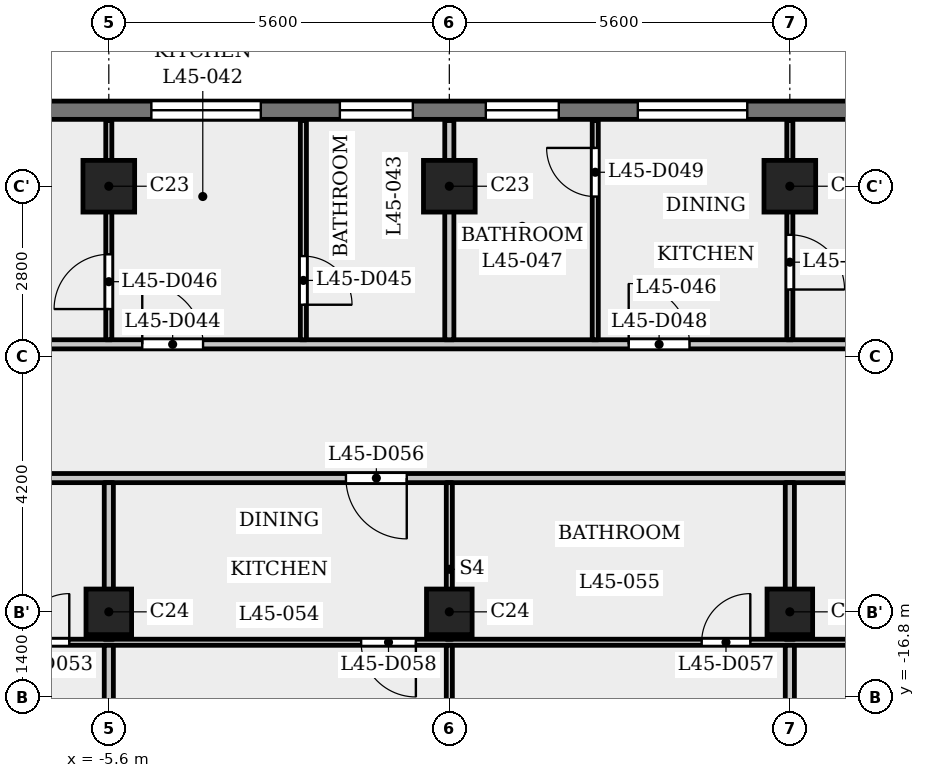
"""IFC4 building model, lengths in metres.
Left out: names, types, materials, properties, quantities, classifications, styles, units other than length and angle.
Written with IfcOpenShell. Run it as: python <this file> out.ifc"""

import sys

from ifc_helpers import new_model, si_unit, direction, frame, frame_2d, origin, origin_2d, place, context, subcontext, project, spatial, rectangle, extrude, element, fill, save


model = new_model("IFC4")
c1 = context("Model", 3, precision=1e-05, world=origin(), true_north=direction((0.0, 1.0)))
c2 = subcontext(c1, "Body", "Model", "MODEL_VIEW")
j1 = project(units=[si_unit("LENGTHUNIT", "METRE"), si_unit("PLANEANGLEUNIT", "RADIAN")], contexts=[c1])
p1 = place(None, origin())
s1 = spatial("IfcSite", under=j1, at=p1, CompositionType="ELEMENT")
p2 = place(p1, origin())
s2 = spatial("IfcBuilding", under=s1, at=p2, CompositionType="ELEMENT")
p3 = place(p2, frame((0.0, 0.0, 174.6)))
s3 = spatial("IfcBuildingStorey", under=s2, at=p3, CompositionType="ELEMENT", Elevation=174.6)
for number, where, z_axis, x_axis in (
    (1, (-5.6, -8.4, 0.0), (0.0, 0.0, 1.0), (1.0, 0.0, 0.0)),
    (2, (0.0, -8.4, 0.0), (0.0, 0.0, 1.0), (1.0, 0.0, 0.0)),
    (3, (5.6, -8.4, 0.0), (0.0, 0.0, 1.0), (1.0, 0.0, 0.0)),
):
    element("IfcColumn", number, at=place(p3, frame(where, z_axis=z_axis, x_axis=x_axis)), inside=s3, PredefinedType="COLUMN", context=c2, shape_type="SweptSolid", body=[
        extrude(rectangle(XDim=0.85, YDim=0.85, at=origin_2d()), origin(), (0.0, 0.0, 1.0), 3.5),
    ])
for number, where, z_axis, x_axis in (
    (4, (-5.6, -15.4, 0.0), (0.0, 0.0, 1.0), (1.0, 0.0, 0.0)),
    (5, (0.0, -15.4, 0.0), (0.0, 0.0, 1.0), (1.0, 0.0, 0.0)),
    (6, (5.6, -15.4, 0.0), (0.0, 0.0, 1.0), (1.0, 0.0, 0.0)),
):
    element("IfcColumn", number, at=place(p3, frame(where, z_axis=z_axis, x_axis=x_axis)), inside=s3, PredefinedType="COLUMN", context=c2, shape_type="SweptSolid", body=[
        extrude(rectangle(XDim=0.75, YDim=0.75, at=origin_2d()), origin(), (0.0, 0.0, 1.0), 3.5),
    ])
p4 = place(p3, frame((13.8, -7.15, 0.0), z_axis=(0.0, 0.0, 1.0), x_axis=(-1.0, 0.0, 0.0)))
e7 = element("IfcWall", 7, at=p4, inside=s3, PredefinedType="SOLIDWALL", context=c2, shape_type="SweptSolid", body=[
    extrude(rectangle(XDim=27.6, YDim=0.3, at=frame_2d((13.8, 0.0))), origin(), (0.0, 0.0, 1.0), 3.15),
])
p5 = place(p4, frame((0.363, 0.0, 0.9)))
e8 = element("IfcOpeningElement", 8, at=p5, cuts=e7, PredefinedType="OPENING", context=c2, shape_type="SweptSolid", body=[
    extrude(rectangle(XDim=1.8, YDim=1.25, at=frame_2d((0.9, 0.625))), frame((0.0, 0.16, 0.0), z_axis=(0.0, -1.0, 0.0), x_axis=(1.0, 0.0, 0.0)), (0.0, 0.0, 1.0), 0.32),
])
p6 = place(p4, frame((3.6, 0.0, 1.2)))
e9 = element("IfcOpeningElement", 9, at=p6, cuts=e7, PredefinedType="OPENING", context=c2, shape_type="SweptSolid", body=[
    extrude(rectangle(XDim=3.6, YDim=0.95, at=frame_2d((1.8, 0.475))), frame((0.0, 0.16, 0.0), z_axis=(0.0, -1.0, 0.0), x_axis=(1.0, 0.0, 0.0)), (0.0, 0.0, 1.0), 0.32),
])
p7 = place(p4, frame((8.9, 0.0, 0.9)))
e10 = element("IfcOpeningElement", 10, at=p7, cuts=e7, PredefinedType="OPENING", context=c2, shape_type="SweptSolid", body=[
    extrude(rectangle(XDim=1.8, YDim=1.25, at=frame_2d((0.9, 0.625))), frame((0.0, 0.16, 0.0), z_axis=(0.0, -1.0, 0.0), x_axis=(1.0, 0.0, 0.0)), (0.0, 0.0, 1.0), 0.32),
])
p8 = place(p4, frame((12.0, 0.0, 0.6)))
e11 = element("IfcOpeningElement", 11, at=p8, cuts=e7, PredefinedType="OPENING", context=c2, shape_type="SweptSolid", body=[
    extrude(rectangle(XDim=1.2, YDim=1.55, at=frame_2d((0.6, 0.775))), frame((0.0, 0.16, 0.0), z_axis=(0.0, -1.0, 0.0), x_axis=(1.0, 0.0, 0.0)), (0.0, 0.0, 1.0), 0.32),
])
p9 = place(p4, frame((14.4, 0.0, 0.6)))
e12 = element("IfcOpeningElement", 12, at=p9, cuts=e7, PredefinedType="OPENING", context=c2, shape_type="SweptSolid", body=[
    extrude(rectangle(XDim=1.2, YDim=1.55, at=frame_2d((0.6, 0.775))), frame((0.0, 0.16, 0.0), z_axis=(0.0, -1.0, 0.0), x_axis=(1.0, 0.0, 0.0)), (0.0, 0.0, 1.0), 0.32),
])
p10 = place(p4, frame((16.9, 0.0, 0.9)))
e13 = element("IfcOpeningElement", 13, at=p10, cuts=e7, PredefinedType="OPENING", context=c2, shape_type="SweptSolid", body=[
    extrude(rectangle(XDim=1.8, YDim=1.25, at=frame_2d((0.9, 0.625))), frame((0.0, 0.16, 0.0), z_axis=(0.0, -1.0, 0.0), x_axis=(1.0, 0.0, 0.0)), (0.0, 0.0, 1.0), 0.32),
])
p11 = place(p4, frame((20.4, 0.0, 1.2)))
e14 = element("IfcOpeningElement", 14, at=p11, cuts=e7, PredefinedType="OPENING", context=c2, shape_type="SweptSolid", body=[
    extrude(rectangle(XDim=3.6, YDim=0.95, at=frame_2d((1.8, 0.475))), frame((0.0, 0.16, 0.0), z_axis=(0.0, -1.0, 0.0), x_axis=(1.0, 0.0, 0.0)), (0.0, 0.0, 1.0), 0.32),
])
p12 = place(p4, frame((25.438, 0.0, 0.9)))
e15 = element("IfcOpeningElement", 15, at=p12, cuts=e7, PredefinedType="OPENING", context=c2, shape_type="SweptSolid", body=[
    extrude(rectangle(XDim=1.8, YDim=1.25, at=frame_2d((0.9, 0.625))), frame((0.0, 0.16, 0.0), z_axis=(0.0, -1.0, 0.0), x_axis=(1.0, 0.0, 0.0)), (0.0, 0.0, 1.0), 0.32),
])
p13 = place(p3, frame((-16.725, -15.9, 0.0), z_axis=(0.0, 0.0, 1.0), x_axis=(1.0, 0.0, 0.0)))
e16 = element("IfcWall", 16, at=p13, inside=s3, PredefinedType="PARTITIONING", context=c2, shape_type="SweptSolid", body=[
    extrude(rectangle(XDim=33.45, YDim=0.1, at=frame_2d((16.725, 0.0))), origin(), (0.0, 0.0, 1.0), 3.15),
])
p14 = place(p13, frame((9.675, 0.0, 0.0)))
e17 = element("IfcOpeningElement", 17, at=p14, cuts=e16, PredefinedType="OPENING", context=c2, shape_type="SweptSolid", body=[
    extrude(rectangle(XDim=0.8, YDim=2.1, at=frame_2d((0.4, 1.05))), frame((0.0, 0.06, 0.0), z_axis=(0.0, -1.0, 0.0), x_axis=(1.0, 0.0, 0.0)), (0.0, 0.0, 1.0), 0.12),
])
p15 = place(p13, frame((4.075, 0.0, 0.0)))
e18 = element("IfcOpeningElement", 18, at=p15, cuts=e16, PredefinedType="OPENING", context=c2, shape_type="SweptSolid", body=[
    extrude(rectangle(XDim=0.9, YDim=2.1, at=frame_2d((0.45, 1.05))), frame((0.0, 0.06, 0.0), z_axis=(0.0, -1.0, 0.0), x_axis=(1.0, 0.0, 0.0)), (0.0, 0.0, 1.0), 0.12),
])
p16 = place(p13, frame((20.875, 0.0, 0.0)))
e19 = element("IfcOpeningElement", 19, at=p16, cuts=e16, PredefinedType="OPENING", context=c2, shape_type="SweptSolid", body=[
    extrude(rectangle(XDim=0.8, YDim=2.1, at=frame_2d((0.4, 1.05))), frame((0.0, 0.06, 0.0), z_axis=(0.0, -1.0, 0.0), x_axis=(1.0, 0.0, 0.0)), (0.0, 0.0, 1.0), 0.12),
])
p17 = place(p13, frame((15.275, 0.0, 0.0)))
e20 = element("IfcOpeningElement", 20, at=p17, cuts=e16, PredefinedType="OPENING", context=c2, shape_type="SweptSolid", body=[
    extrude(rectangle(XDim=0.9, YDim=2.1, at=frame_2d((0.45, 1.05))), frame((0.0, 0.06, 0.0), z_axis=(0.0, -1.0, 0.0), x_axis=(1.0, 0.0, 0.0)), (0.0, 0.0, 1.0), 0.12),
])
p18 = place(p13, frame((30.825, 0.0, 0.0)))
e21 = element("IfcOpeningElement", 21, at=p18, cuts=e16, PredefinedType="OPENING", context=c2, shape_type="SweptSolid", body=[
    extrude(rectangle(XDim=0.8, YDim=2.1, at=frame_2d((0.4, 1.05))), frame((0.0, 0.06, 0.0), z_axis=(0.0, -1.0, 0.0), x_axis=(1.0, 0.0, 0.0)), (0.0, 0.0, 1.0), 0.12),
])
p19 = place(p13, frame((26.475, 0.0, 0.0)))
e22 = element("IfcOpeningElement", 22, at=p19, cuts=e16, PredefinedType="OPENING", context=c2, shape_type="SweptSolid", body=[
    extrude(rectangle(XDim=0.9, YDim=2.1, at=frame_2d((0.45, 1.05))), frame((0.0, 0.06, 0.0), z_axis=(0.0, -1.0, 0.0), x_axis=(1.0, 0.0, 0.0)), (0.0, 0.0, 1.0), 0.12),
])
p20 = place(p3, frame((-17.4, -13.2, 0.0), z_axis=(0.0, 0.0, 1.0), x_axis=(1.0, 0.0, 0.0)))
e23 = element("IfcWall", 23, at=p20, inside=s3, PredefinedType="PARTITIONING", context=c2, shape_type="SweptSolid", body=[
    extrude(rectangle(XDim=34.8, YDim=0.15, at=frame_2d((17.4, 0.0))), origin(), (0.0, 0.0, 1.0), 3.15),
])
p21 = place(p20, frame((0.15, 0.0, 0.0)))
e24 = element("IfcOpeningElement", 24, at=p21, cuts=e23, PredefinedType="OPENING", context=c2, shape_type="SweptSolid", body=[
    extrude(rectangle(XDim=1.0, YDim=2.1, at=frame_2d((0.5, 1.05))), frame((0.0, 0.085, 0.0), z_axis=(0.0, -1.0, 0.0), x_axis=(1.0, 0.0, 0.0)), (0.0, 0.0, 1.0), 0.17),
])
p22 = place(p20, frame((33.55, 0.0, 0.0)))
e25 = element("IfcOpeningElement", 25, at=p22, cuts=e23, PredefinedType="OPENING", context=c2, shape_type="SweptSolid", body=[
    extrude(rectangle(XDim=1.0, YDim=2.1, at=frame_2d((0.5, 1.05))), frame((0.0, 0.085, 0.0), z_axis=(0.0, -1.0, 0.0), x_axis=(1.0, 0.0, 0.0)), (0.0, 0.0, 1.0), 0.17),
])
p23 = place(p20, frame((15.7, 0.0, 0.0)))
e26 = element("IfcOpeningElement", 26, at=p23, cuts=e23, PredefinedType="OPENING", context=c2, shape_type="SweptSolid", body=[
    extrude(rectangle(XDim=1.0, YDim=2.1, at=frame_2d((0.5, 1.05))), frame((0.0, 0.085, 0.0), z_axis=(0.0, -1.0, 0.0), x_axis=(1.0, 0.0, 0.0)), (0.0, 0.0, 1.0), 0.17),
])
p24 = place(p20, frame((26.9, 0.0, 0.0)))
e27 = element("IfcOpeningElement", 27, at=p24, cuts=e23, PredefinedType="OPENING", context=c2, shape_type="SweptSolid", body=[
    extrude(rectangle(XDim=1.0, YDim=2.1, at=frame_2d((0.5, 1.05))), frame((0.0, 0.085, 0.0), z_axis=(0.0, -1.0, 0.0), x_axis=(1.0, 0.0, 0.0)), (0.0, 0.0, 1.0), 0.17),
])
p25 = place(p3, frame((-14.925, -11.0, 0.0), z_axis=(0.0, 0.0, 1.0), x_axis=(1.0, 0.0, 0.0)))
e28 = element("IfcWall", 28, at=p25, inside=s3, PredefinedType="PARTITIONING", context=c2, shape_type="SweptSolid", body=[
    extrude(rectangle(XDim=29.85, YDim=0.15, at=frame_2d((14.925, 0.0))), origin(), (0.0, 0.0, 1.0), 3.15),
])
p26 = place(p25, frame((9.875, 0.0, 0.0)))
e29 = element("IfcOpeningElement", 29, at=p26, cuts=e28, PredefinedType="OPENING", context=c2, shape_type="SweptSolid", body=[
    extrude(rectangle(XDim=1.0, YDim=2.1, at=frame_2d((0.5, 1.05))), frame((0.0, 0.085, 0.0), z_axis=(0.0, -1.0, 0.0), x_axis=(1.0, 0.0, 0.0)), (0.0, 0.0, 1.0), 0.17),
])
p27 = place(p25, frame((17.875, 0.0, 0.0)))
e30 = element("IfcOpeningElement", 30, at=p27, cuts=e28, PredefinedType="OPENING", context=c2, shape_type="SweptSolid", body=[
    extrude(rectangle(XDim=1.0, YDim=2.1, at=frame_2d((0.5, 1.05))), frame((0.0, 0.085, 0.0), z_axis=(0.0, -1.0, 0.0), x_axis=(1.0, 0.0, 0.0)), (0.0, 0.0, 1.0), 0.17),
])
p28 = place(p3, frame((-5.6, -10.925, 0.0), z_axis=(0.0, 0.0, 1.0), x_axis=(0.0, 1.0, 0.0)))
e31 = element("IfcWall", 31, at=p28, inside=s3, PredefinedType="PARTITIONING", context=c2, shape_type="SweptSolid", body=[
    extrude(rectangle(XDim=3.605, YDim=0.1, at=frame_2d((1.802, 0.0))), origin(), (0.0, 0.0, 1.0), 3.15),
])
p29 = place(p28, frame((0.505, 0.0, 0.0)))
e32 = element("IfcOpeningElement", 32, at=p29, cuts=e31, PredefinedType="OPENING", context=c2, shape_type="SweptSolid", body=[
    extrude(rectangle(XDim=0.9, YDim=2.1, at=frame_2d((0.45, 1.05))), frame((0.0, 0.06, 0.0), z_axis=(0.0, -1.0, 0.0), x_axis=(1.0, 0.0, 0.0)), (0.0, 0.0, 1.0), 0.12),
])
p30 = place(p3, frame((-5.6, -22.88, 0.0), z_axis=(0.0, 0.0, 1.0), x_axis=(0.0, 1.0, 0.0)))
e33 = element("IfcWall", 33, at=p30, inside=s3, PredefinedType="PARTITIONING", context=c2, shape_type="SweptSolid", body=[
    extrude(rectangle(XDim=6.93, YDim=0.15, at=frame_2d((3.465, 0.0))), origin(), (0.0, 0.0, 1.0), 3.15),
])
p31 = place(p3, frame((-5.6, -15.85, 0.0), z_axis=(0.0, 0.0, 1.0), x_axis=(0.0, 1.0, 0.0)))
e34 = element("IfcWall", 34, at=p31, inside=s3, PredefinedType="PARTITIONING", context=c2, shape_type="SweptSolid", body=[
    extrude(rectangle(XDim=2.575, YDim=0.15, at=frame_2d((1.288, 0.0))), origin(), (0.0, 0.0, 1.0), 3.15),
])
p32 = place(p3, frame((-2.4, -10.925, 0.0), z_axis=(0.0, 0.0, 1.0), x_axis=(0.0, 1.0, 0.0)))
e35 = element("IfcWall", 35, at=p32, inside=s3, PredefinedType="PARTITIONING", context=c2, shape_type="SweptSolid", body=[
    extrude(rectangle(XDim=3.605, YDim=0.1, at=frame_2d((1.802, 0.0))), origin(), (0.0, 0.0, 1.0), 3.15),
])
p33 = place(p32, frame((0.576, 0.0, 0.0)))
e36 = element("IfcOpeningElement", 36, at=p33, cuts=e35, PredefinedType="OPENING", context=c2, shape_type="SweptSolid", body=[
    extrude(rectangle(XDim=0.8, YDim=2.1, at=frame_2d((0.4, 1.05))), frame((0.0, 0.06, 0.0), z_axis=(0.0, -1.0, 0.0), x_axis=(1.0, 0.0, 0.0)), (0.0, 0.0, 1.0), 0.12),
])
p34 = place(p3, frame((0.0, -22.88, 0.0), z_axis=(0.0, 0.0, 1.0), x_axis=(0.0, 1.0, 0.0)))
e37 = element("IfcWall", 37, at=p34, inside=s3, PredefinedType="PARTITIONING", context=c2, shape_type="SweptSolid", body=[
    extrude(rectangle(XDim=6.93, YDim=0.1, at=frame_2d((3.465, 0.0))), origin(), (0.0, 0.0, 1.0), 3.15),
])
p35 = place(p34, frame((1.22, 0.0, 0.0)))
e38 = element("IfcOpeningElement", 38, at=p35, cuts=e37, PredefinedType="OPENING", context=c2, shape_type="SweptSolid", body=[
    extrude(rectangle(XDim=0.9, YDim=2.1, at=frame_2d((0.45, 1.05))), frame((0.0, 0.06, 0.0), z_axis=(0.0, -1.0, 0.0), x_axis=(1.0, 0.0, 0.0)), (0.0, 0.0, 1.0), 0.12),
])
p36 = place(p3, frame((0.0, -15.85, 0.0), z_axis=(0.0, 0.0, 1.0), x_axis=(0.0, 1.0, 0.0)))
e39 = element("IfcWall", 39, at=p36, inside=s3, PredefinedType="PARTITIONING", context=c2, shape_type="SweptSolid", body=[
    extrude(rectangle(XDim=2.575, YDim=0.1, at=frame_2d((1.288, 0.0))), origin(), (0.0, 0.0, 1.0), 3.15),
])
p37 = place(p3, frame((0.0, -10.925, 0.0), z_axis=(0.0, 0.0, 1.0), x_axis=(0.0, 1.0, 0.0)))
e40 = element("IfcWall", 40, at=p37, inside=s3, PredefinedType="PARTITIONING", context=c2, shape_type="SweptSolid", body=[
    extrude(rectangle(XDim=3.605, YDim=0.15, at=frame_2d((1.802, 0.0))), origin(), (0.0, 0.0, 1.0), 3.15),
])
p38 = place(p3, frame((2.4, -10.925, 0.0), z_axis=(0.0, 0.0, 1.0), x_axis=(0.0, 1.0, 0.0)))
e41 = element("IfcWall", 41, at=p38, inside=s3, PredefinedType="PARTITIONING", context=c2, shape_type="SweptSolid", body=[
    extrude(rectangle(XDim=3.605, YDim=0.1, at=frame_2d((1.802, 0.0))), origin(), (0.0, 0.0, 1.0), 3.15),
])
p39 = place(p38, frame((2.355, 0.0, 0.0)))
e42 = element("IfcOpeningElement", 42, at=p39, cuts=e41, PredefinedType="OPENING", context=c2, shape_type="SweptSolid", body=[
    extrude(rectangle(XDim=0.8, YDim=2.1, at=frame_2d((0.4, 1.05))), frame((0.0, 0.06, 0.0), z_axis=(0.0, -1.0, 0.0), x_axis=(1.0, 0.0, 0.0)), (0.0, 0.0, 1.0), 0.12),
])
p40 = place(p3, frame((5.6, -10.925, 0.0), z_axis=(0.0, 0.0, 1.0), x_axis=(0.0, 1.0, 0.0)))
e43 = element("IfcWall", 43, at=p40, inside=s3, PredefinedType="PARTITIONING", context=c2, shape_type="SweptSolid", body=[
    extrude(rectangle(XDim=3.605, YDim=0.1, at=frame_2d((1.802, 0.0))), origin(), (0.0, 0.0, 1.0), 3.15),
])
p41 = place(p40, frame((0.826, 0.0, 0.0)))
e44 = element("IfcOpeningElement", 44, at=p41, cuts=e43, PredefinedType="OPENING", context=c2, shape_type="SweptSolid", body=[
    extrude(rectangle(XDim=0.9, YDim=2.1, at=frame_2d((0.45, 1.05))), frame((0.0, 0.06, 0.0), z_axis=(0.0, -1.0, 0.0), x_axis=(1.0, 0.0, 0.0)), (0.0, 0.0, 1.0), 0.12),
])
p42 = place(p3, frame((5.6, -22.88, 0.0), z_axis=(0.0, 0.0, 1.0), x_axis=(0.0, 1.0, 0.0)))
e45 = element("IfcWall", 45, at=p42, inside=s3, PredefinedType="PARTITIONING", context=c2, shape_type="SweptSolid", body=[
    extrude(rectangle(XDim=6.93, YDim=0.15, at=frame_2d((3.465, 0.0))), origin(), (0.0, 0.0, 1.0), 3.15),
])
p43 = place(p3, frame((5.6, -15.85, 0.0), z_axis=(0.0, 0.0, 1.0), x_axis=(0.0, 1.0, 0.0)))
e46 = element("IfcWall", 46, at=p43, inside=s3, PredefinedType="PARTITIONING", context=c2, shape_type="SweptSolid", body=[
    extrude(rectangle(XDim=2.575, YDim=0.15, at=frame_2d((1.288, 0.0))), origin(), (0.0, 0.0, 1.0), 3.15),
])
p44 = place(p26, origin())
e47 = element("IfcDoor", 47, at=p44, inside=s3, OperationType="SINGLE_SWING_RIGHT", PredefinedType="DOOR", context=c2, shape_type="SweptSolid", body=[
    extrude(rectangle(XDim=1.0, YDim=2.1, at=frame_2d((0.5, 1.05))), frame((0.0, 0.025, 0.0), z_axis=(0.0, -1.0, 0.0), x_axis=(1.0, 0.0, 0.0)), (0.0, 0.0, 1.0), 0.05),
])
fill(e29, e47)
p45 = place(p33, origin())
e48 = element("IfcDoor", 48, at=p45, inside=s3, OperationType="SINGLE_SWING_LEFT", PredefinedType="DOOR", context=c2, shape_type="SweptSolid", body=[
    extrude(rectangle(XDim=0.8, YDim=2.1, at=frame_2d((0.4, 1.05))), frame((0.0, 0.025, 0.0), z_axis=(0.0, -1.0, 0.0), x_axis=(1.0, 0.0, 0.0)), (0.0, 0.0, 1.0), 0.05),
])
fill(e36, e48)
p46 = place(p29, origin())
e49 = element("IfcDoor", 49, at=p46, inside=s3, OperationType="SINGLE_SWING_RIGHT", PredefinedType="DOOR", context=c2, shape_type="SweptSolid", body=[
    extrude(rectangle(XDim=0.9, YDim=2.1, at=frame_2d((0.45, 1.05))), frame((0.0, 0.025, 0.0), z_axis=(0.0, -1.0, 0.0), x_axis=(1.0, 0.0, 0.0)), (0.0, 0.0, 1.0), 0.05),
])
fill(e32, e49)
p47 = place(p27, origin())
e50 = element("IfcDoor", 50, at=p47, inside=s3, OperationType="SINGLE_SWING_RIGHT", PredefinedType="DOOR", context=c2, shape_type="SweptSolid", body=[
    extrude(rectangle(XDim=1.0, YDim=2.1, at=frame_2d((0.5, 1.05))), frame((0.0, 0.025, 0.0), z_axis=(0.0, -1.0, 0.0), x_axis=(1.0, 0.0, 0.0)), (0.0, 0.0, 1.0), 0.05),
])
fill(e30, e50)
p48 = place(p39, origin())
e51 = element("IfcDoor", 51, at=p48, inside=s3, OperationType="SINGLE_SWING_LEFT", PredefinedType="DOOR", context=c2, shape_type="SweptSolid", body=[
    extrude(rectangle(XDim=0.8, YDim=2.1, at=frame_2d((0.4, 1.05))), frame((0.0, 0.025, 0.0), z_axis=(0.0, -1.0, 0.0), x_axis=(1.0, 0.0, 0.0)), (0.0, 0.0, 1.0), 0.05),
])
fill(e42, e51)
p49 = place(p41, origin())
e52 = element("IfcDoor", 52, at=p49, inside=s3, OperationType="SINGLE_SWING_LEFT", PredefinedType="DOOR", context=c2, shape_type="SweptSolid", body=[
    extrude(rectangle(XDim=0.9, YDim=2.1, at=frame_2d((0.45, 1.05))), frame((0.0, 0.025, 0.0), z_axis=(0.0, -1.0, 0.0), x_axis=(1.0, 0.0, 0.0)), (0.0, 0.0, 1.0), 0.05),
])
fill(e44, e52)
p50 = place(p14, origin())
e53 = element("IfcDoor", 53, at=p50, inside=s3, OperationType="SINGLE_SWING_LEFT", PredefinedType="DOOR", context=c2, shape_type="SweptSolid", body=[
    extrude(rectangle(XDim=0.8, YDim=2.1, at=frame_2d((0.4, 1.05))), frame((0.0, 0.025, 0.0), z_axis=(0.0, -1.0, 0.0), x_axis=(1.0, 0.0, 0.0)), (0.0, 0.0, 1.0), 0.05),
])
fill(e17, e53)
p51 = place(p23, origin())
e54 = element("IfcDoor", 54, at=p51, inside=s3, OperationType="SINGLE_SWING_RIGHT", PredefinedType="DOOR", context=c2, shape_type="SweptSolid", body=[
    extrude(rectangle(XDim=1.0, YDim=2.1, at=frame_2d((0.5, 1.05))), frame((0.0, 0.025, 0.0), z_axis=(0.0, -1.0, 0.0), x_axis=(1.0, 0.0, 0.0)), (0.0, 0.0, 1.0), 0.05),
])
fill(e26, e54)
p52 = place(p16, origin())
e55 = element("IfcDoor", 55, at=p52, inside=s3, OperationType="SINGLE_SWING_LEFT", PredefinedType="DOOR", context=c2, shape_type="SweptSolid", body=[
    extrude(rectangle(XDim=0.8, YDim=2.1, at=frame_2d((0.4, 1.05))), frame((0.0, 0.025, 0.0), z_axis=(0.0, -1.0, 0.0), x_axis=(1.0, 0.0, 0.0)), (0.0, 0.0, 1.0), 0.05),
])
fill(e19, e55)
p53 = place(p17, origin())
e56 = element("IfcDoor", 56, at=p53, inside=s3, OperationType="SINGLE_SWING_RIGHT", PredefinedType="DOOR", context=c2, shape_type="SweptSolid", body=[
    extrude(rectangle(XDim=0.9, YDim=2.1, at=frame_2d((0.45, 1.05))), frame((0.0, 0.025, 0.0), z_axis=(0.0, -1.0, 0.0), x_axis=(1.0, 0.0, 0.0)), (0.0, 0.0, 1.0), 0.05),
])
fill(e20, e56)
p54 = place(p7, origin())
e57 = element("IfcWindow", 57, at=p54, inside=s3, PartitioningType="SINGLE_PANEL", PredefinedType="WINDOW", context=c2, shape_type="SweptSolid", body=[
    extrude(rectangle(XDim=1.8, YDim=1.25, at=frame_2d((0.9, 0.625))), frame((0.0, 0.03, 0.0), z_axis=(0.0, -1.0, 0.0), x_axis=(1.0, 0.0, 0.0)), (0.0, 0.0, 1.0), 0.06),
])
fill(e10, e57)
p55 = place(p8, origin())
e58 = element("IfcWindow", 58, at=p55, inside=s3, PartitioningType="SINGLE_PANEL", PredefinedType="WINDOW", context=c2, shape_type="SweptSolid", body=[
    extrude(rectangle(XDim=1.2, YDim=1.55, at=frame_2d((0.6, 0.775))), frame((0.0, 0.03, 0.0), z_axis=(0.0, -1.0, 0.0), x_axis=(1.0, 0.0, 0.0)), (0.0, 0.0, 1.0), 0.06),
])
fill(e11, e58)
p56 = place(p9, origin())
e59 = element("IfcWindow", 59, at=p56, inside=s3, PartitioningType="SINGLE_PANEL", PredefinedType="WINDOW", context=c2, shape_type="SweptSolid", body=[
    extrude(rectangle(XDim=1.2, YDim=1.55, at=frame_2d((0.6, 0.775))), frame((0.0, 0.03, 0.0), z_axis=(0.0, -1.0, 0.0), x_axis=(1.0, 0.0, 0.0)), (0.0, 0.0, 1.0), 0.06),
])
fill(e12, e59)
p57 = place(p10, origin())
e60 = element("IfcWindow", 60, at=p57, inside=s3, PartitioningType="SINGLE_PANEL", PredefinedType="WINDOW", context=c2, shape_type="SweptSolid", body=[
    extrude(rectangle(XDim=1.8, YDim=1.25, at=frame_2d((0.9, 0.625))), frame((0.0, 0.03, 0.0), z_axis=(0.0, -1.0, 0.0), x_axis=(1.0, 0.0, 0.0)), (0.0, 0.0, 1.0), 0.06),
])
fill(e13, e60)
save(model, sys.argv[1])
